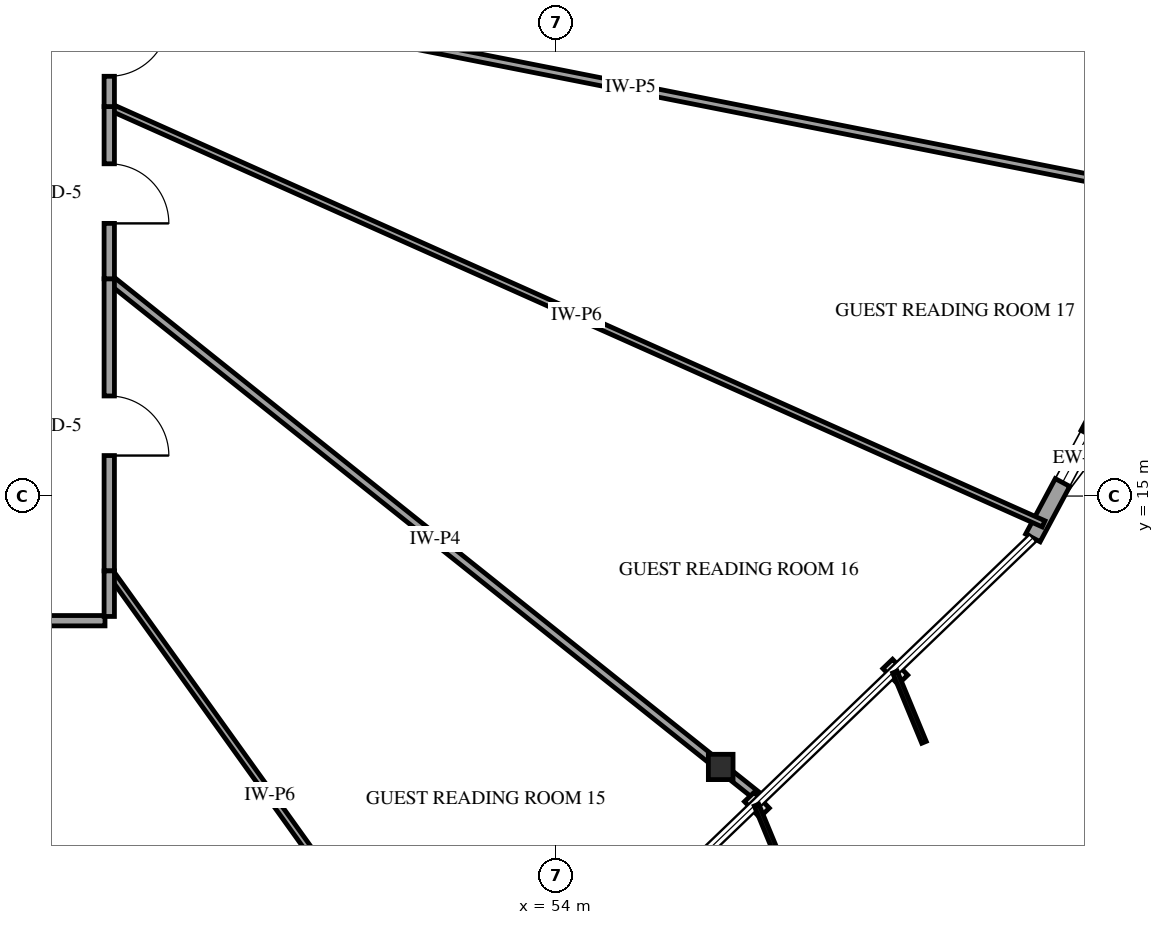
"""IFC4 building model, lengths in metres.
Left out: names, types, materials, properties, quantities, classifications, styles, units other than length and angle.
Written with IfcOpenShell. Run it as: python <this file> out.ifc"""

import sys

from ifc_helpers import new_model, si_unit, direction, frame, frame_2d, origin, origin_2d, place, context, subcontext, project, spatial, rectangle, i_section, extrude, element, fill, save


model = new_model("IFC4")
c1 = context("Model", 3, precision=1e-05, world=origin(), true_north=direction((0.0, 1.0)))
c2 = subcontext(c1, "Body", "Model", "MODEL_VIEW")
j1 = project(units=[si_unit("LENGTHUNIT", "METRE"), si_unit("PLANEANGLEUNIT", "RADIAN")], contexts=[c1])
p1 = place(None, origin())
s1 = spatial("IfcSite", under=j1, at=p1, CompositionType="ELEMENT")
p2 = place(p1, origin())
s2 = spatial("IfcBuilding", under=s1, at=p2, CompositionType="ELEMENT")
p3 = place(p2, frame((0.0, 0.0, 194.2)))
s3 = spatial("IfcBuildingStorey", under=s2, at=p3, CompositionType="ELEMENT", Elevation=194.2)
p4 = place(p3, frame((56.705, 10.545, 0.0), z_axis=(0.0, 0.0, 1.0), x_axis=(1.0, 0.0, 0.0)))
e1 = element("IfcColumn", 1, at=p4, inside=s3, PredefinedType="COLUMN", context=c2, shape_type="SweptSolid", body=[
    extrude(i_section(OverallWidth=0.406, OverallDepth=0.416, WebThickness=0.03, FlangeThickness=0.048, FilletRadius=0.038, at=origin_2d()), origin(), (0.0, 0.0, 1.0), 3.6),
])
p5 = place(p3, frame((61.839, 14.312, 0.0), z_axis=(0.0, 0.0, 1.0), x_axis=(0.471634393059, 0.88179419327, 0.0)))
e2 = element("IfcWall", 2, at=p5, inside=s3, PredefinedType="SOLIDWALL", context=c2, shape_type="SweptSolid", body=[
    extrude(rectangle(XDim=2.967, YDim=0.27, at=frame_2d((1.483, 0.0))), origin(), (0.0, 0.0, 1.0), 2.679),
])
p6 = place(p5, frame((1.033, 0.0, 0.75)))
e3 = element("IfcOpeningElement", 3, at=p6, cuts=e2, PredefinedType="OPENING", context=c2, shape_type="SweptSolid", body=[
    extrude(rectangle(XDim=0.9, YDim=1.5, at=frame_2d((0.45, 0.75))), frame((0.0, 0.145, 0.0), z_axis=(0.0, -1.0, 0.0), x_axis=(1.0, 0.0, 0.0)), (0.0, 0.0, 1.0), 0.29),
])
p7 = place(p3, frame((46.65, 23.41, 0.0), z_axis=(0.0, 0.0, 1.0), x_axis=(0.981034263722, -0.193834396853, 0.0)))
e4 = element("IfcWall", 4, at=p7, inside=s3, PredefinedType="PARTITIONING", context=c2, shape_type="SweptSolid", body=[
    extrude(rectangle(XDim=17.473, YDim=0.13, at=frame_2d((8.737, 0.0))), origin(), (0.0, 0.0, 1.0), 2.595),
])
p8 = place(p3, frame((46.65, 21.405, 0.0), z_axis=(0.0, 0.0, 1.0), x_axis=(0.913078369875, -0.407784122381, 0.0)))
e5 = element("IfcWall", 5, at=p8, inside=s3, PredefinedType="PARTITIONING", context=c2, shape_type="SweptSolid", body=[
    extrude(rectangle(XDim=16.828, YDim=0.11, at=frame_2d((8.414, 0.0))), origin(), (0.0, 0.0, 1.0), 3.3),
])
p9 = place(p3, frame((46.65, 18.573, 0.0), z_axis=(0.0, 0.0, 1.0), x_axis=(0.781519613494, -0.623880672665, 0.0)))
e6 = element("IfcWall", 6, at=p9, inside=s3, PredefinedType="PARTITIONING", context=c2, shape_type="SweptSolid", body=[
    extrude(rectangle(XDim=13.716, YDim=0.14, at=frame_2d((6.858, 0.0))), origin(), (0.0, 0.0, 1.0), 3.3),
])
p10 = place(p3, frame((46.65, 13.769, 0.0), z_axis=(0.0, 0.0, 1.0), x_axis=(0.582523685051, -0.812813727956, 0.0)))
e7 = element("IfcWall", 7, at=p10, inside=s3, PredefinedType="PARTITIONING", context=c2, shape_type="SweptSolid", body=[
    extrude(rectangle(XDim=9.067, YDim=0.11, at=frame_2d((4.534, 0.0))), origin(), (0.0, 0.0, 1.0), 2.678),
])
p11 = place(p3, frame((43.383, 12.95, 0.0), z_axis=(0.0, 0.0, 1.0), x_axis=(0.369089180525, -0.929393983636, 0.0)))
e8 = element("IfcWall", 8, at=p11, inside=s3, PredefinedType="PARTITIONING", context=c2, shape_type="SweptSolid", body=[
    extrude(rectangle(XDim=7.887, YDim=0.13, at=frame_2d((3.943, 0.0))), origin(), (0.0, 0.0, 1.0), 2.595),
])
p12 = place(p11, frame((3.518, 0.0, 0.0)))
e9 = element("IfcOpeningElement", 9, at=p12, cuts=e8, PredefinedType="OPENING", context=c2, shape_type="SweptSolid", body=[
    extrude(rectangle(XDim=0.85, YDim=2.1, at=frame_2d((0.425, 1.05))), frame((0.0, 0.075, 0.0), z_axis=(0.0, -1.0, 0.0), x_axis=(1.0, 0.0, 0.0)), (0.0, 0.0, 1.0), 0.15),
])
p13 = place(p3, frame((46.65, 18.573, 0.0), z_axis=(0.0, 0.0, 1.0), x_axis=(0.0, -1.0, 0.0)))
e10 = element("IfcWall", 10, at=p13, inside=s3, PredefinedType="PARTITIONING", context=c2, shape_type="SweptSolid", body=[
    extrude(rectangle(XDim=4.804, YDim=0.17, at=frame_2d((2.402, 0.0))), origin(), (0.0, 0.0, 1.0), 3.3),
])
p14 = place(p13, frame((1.927, 0.0, 0.0)))
e11 = element("IfcOpeningElement", 11, at=p14, cuts=e10, PredefinedType="OPENING", context=c2, shape_type="SweptSolid", body=[
    extrude(rectangle(XDim=0.98, YDim=2.15, at=frame_2d((0.49, 1.075))), frame((0.0, 0.095, 0.0), z_axis=(0.0, -1.0, 0.0), x_axis=(1.0, 0.0, 0.0)), (0.0, 0.0, 1.0), 0.19),
])
p15 = place(p3, frame((46.58, 12.95, 0.0), z_axis=(0.0, 0.0, 1.0), x_axis=(-1.0, 0.0, 0.0)))
e12 = element("IfcWall", 12, at=p15, inside=s3, PredefinedType="PARTITIONING", context=c2, shape_type="SweptSolid", body=[
    extrude(rectangle(XDim=3.197, YDim=0.17, at=frame_2d((1.599, 0.0))), origin(), (0.0, 0.0, 1.0), 3.3),
])
p16 = place(p15, frame((1.123, 0.0, 0.0)))
e13 = element("IfcOpeningElement", 13, at=p16, cuts=e12, PredefinedType="OPENING", context=c2, shape_type="SweptSolid", body=[
    extrude(rectangle(XDim=0.98, YDim=2.15, at=frame_2d((0.49, 1.075))), frame((0.0, 0.095, 0.0), z_axis=(0.0, -1.0, 0.0), x_axis=(1.0, 0.0, 0.0)), (0.0, 0.0, 1.0), 0.19),
])
p17 = place(p3, frame((46.65, 21.405, 0.0), z_axis=(0.0, 0.0, 1.0), x_axis=(0.0, -1.0, 0.0)))
e14 = element("IfcWall", 14, at=p17, inside=s3, PredefinedType="PARTITIONING", context=c2, shape_type="SweptSolid", body=[
    extrude(rectangle(XDim=2.832, YDim=0.17, at=frame_2d((1.416, 0.0))), origin(), (0.0, 0.0, 1.0), 3.3),
])
p18 = place(p17, frame((0.941, 0.0, 0.0)))
e15 = element("IfcOpeningElement", 15, at=p18, cuts=e14, PredefinedType="OPENING", context=c2, shape_type="SweptSolid", body=[
    extrude(rectangle(XDim=0.98, YDim=2.15, at=frame_2d((0.49, 1.075))), frame((0.0, 0.095, 0.0), z_axis=(0.0, -1.0, 0.0), x_axis=(1.0, 0.0, 0.0)), (0.0, 0.0, 1.0), 0.19),
])
p19 = place(p3, frame((46.65, 23.41, 0.0), z_axis=(0.0, 0.0, 1.0), x_axis=(0.0, -1.0, 0.0)))
e16 = element("IfcWall", 16, at=p19, inside=s3, PredefinedType="PARTITIONING", context=c2, shape_type="SweptSolid", body=[
    extrude(rectangle(XDim=2.005, YDim=0.17, at=frame_2d((1.002, 0.0))), origin(), (0.0, 0.0, 1.0), 3.3),
])
p20 = place(p19, frame((0.527, 0.0, 0.0)))
e17 = element("IfcOpeningElement", 17, at=p20, cuts=e16, PredefinedType="OPENING", context=c2, shape_type="SweptSolid", body=[
    extrude(rectangle(XDim=0.98, YDim=2.15, at=frame_2d((0.49, 1.075))), frame((0.0, 0.095, 0.0), z_axis=(0.0, -1.0, 0.0), x_axis=(1.0, 0.0, 0.0)), (0.0, 0.0, 1.0), 0.19),
])
p21 = place(p3, frame((46.65, 13.769, 0.0), z_axis=(0.0, 0.0, 1.0), x_axis=(0.0, -1.0, 0.0)))
e18 = element("IfcWall", 18, at=p21, inside=s3, PredefinedType="PARTITIONING", context=c2, shape_type="SweptSolid", body=[
    extrude(rectangle(XDim=0.749, YDim=0.17, at=frame_2d((0.375, 0.0))), origin(), (0.0, 0.0, 1.0), 3.3),
])
p22 = place(p6, origin())
e19 = element("IfcWindow", 19, at=p22, inside=s3, PartitioningType="SINGLE_PANEL", PredefinedType="WINDOW", context=c2, shape_type="SweptSolid", body=[
    extrude(rectangle(XDim=0.9, YDim=1.5, at=frame_2d((0.45, 0.75))), frame((0.0, 0.03, 0.0), z_axis=(0.0, -1.0, 0.0), x_axis=(1.0, 0.0, 0.0)), (0.0, 0.0, 1.0), 0.06),
])
fill(e3, e19)
p23 = place(p14, origin())
e20 = element("IfcDoor", 20, at=p23, inside=s3, OperationType="SINGLE_SWING_RIGHT", PredefinedType="DOOR", context=c2, shape_type="SweptSolid", body=[
    extrude(rectangle(XDim=0.98, YDim=2.15, at=frame_2d((0.49, 1.075))), frame((0.0, 0.025, 0.0), z_axis=(0.0, -1.0, 0.0), x_axis=(1.0, 0.0, 0.0)), (0.0, 0.0, 1.0), 0.05),
])
fill(e11, e20)
p24 = place(p18, origin())
e21 = element("IfcDoor", 21, at=p24, inside=s3, OperationType="SINGLE_SWING_RIGHT", PredefinedType="DOOR", context=c2, shape_type="SweptSolid", body=[
    extrude(rectangle(XDim=0.98, YDim=2.15, at=frame_2d((0.49, 1.075))), frame((0.0, 0.025, 0.0), z_axis=(0.0, -1.0, 0.0), x_axis=(1.0, 0.0, 0.0)), (0.0, 0.0, 1.0), 0.05),
])
fill(e15, e21)
p25 = place(p20, origin())
e22 = element("IfcDoor", 22, at=p25, inside=s3, OperationType="SINGLE_SWING_LEFT", PredefinedType="DOOR", context=c2, shape_type="SweptSolid", body=[
    extrude(rectangle(XDim=0.98, YDim=2.15, at=frame_2d((0.49, 1.075))), frame((0.0, 0.025, 0.0), z_axis=(0.0, -1.0, 0.0), x_axis=(1.0, 0.0, 0.0)), (0.0, 0.0, 1.0), 0.05),
])
fill(e17, e22)
save(model, sys.argv[1])
